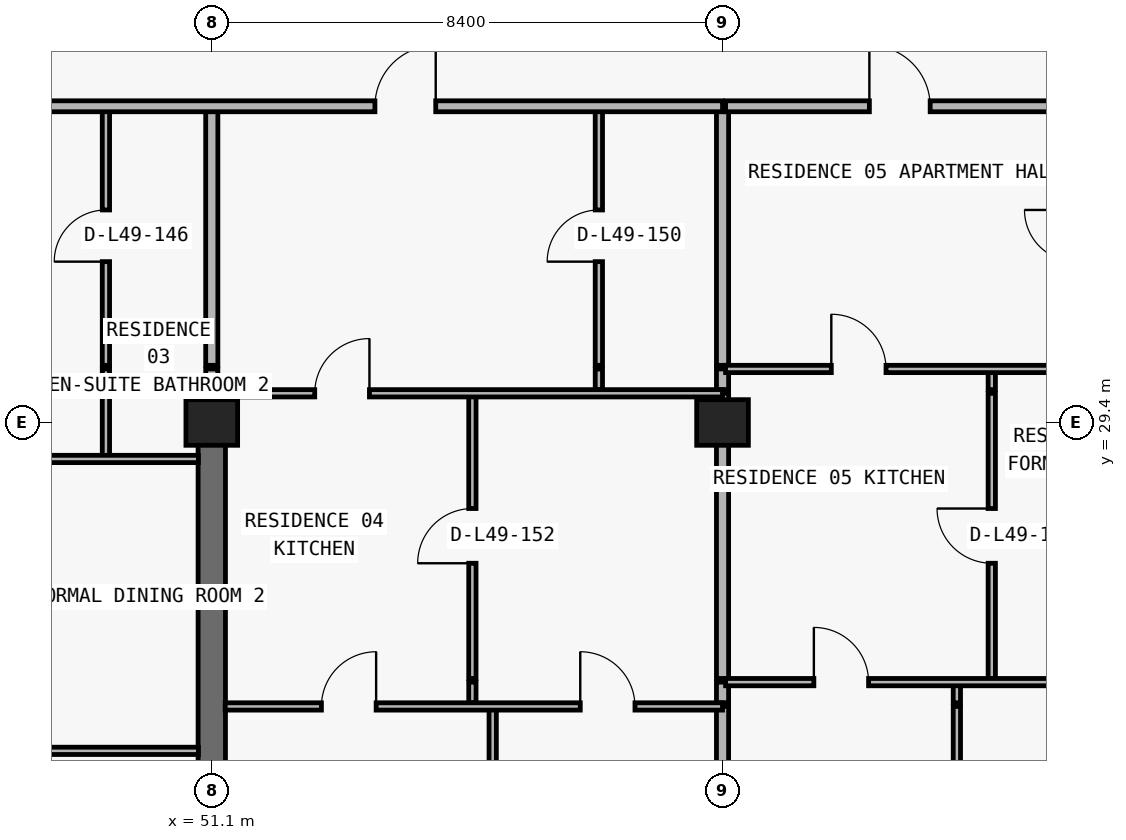
"""IFC4 building model, lengths in metres.
Left out: names, types, materials, properties, quantities, classifications, styles, units other than length and angle.
Written with IfcOpenShell. Run it as: python <this file> out.ifc"""

import sys

from ifc_helpers import new_model, si_unit, direction, frame, frame_2d, origin, origin_2d, place, context, subcontext, project, spatial, rectangle, extrude, element, fill, save


model = new_model("IFC4")
c1 = context("Model", 3, precision=1e-05, world=origin(), true_north=direction((0.0, 1.0)))
c2 = subcontext(c1, "Body", "Model", "MODEL_VIEW")
j1 = project(units=[si_unit("LENGTHUNIT", "METRE"), si_unit("PLANEANGLEUNIT", "RADIAN")], contexts=[c1])
p1 = place(None, origin())
s1 = spatial("IfcSite", under=j1, at=p1, CompositionType="ELEMENT")
p2 = place(p1, origin())
s2 = spatial("IfcBuilding", under=s1, at=p2, CompositionType="ELEMENT")
p3 = place(p2, frame((0.0, 0.0, 177.0)))
s3 = spatial("IfcBuildingStorey", under=s2, at=p3, CompositionType="ELEMENT", Elevation=177.0)
for number, where, z_axis, x_axis in (
    (1, (51.1, 29.4, 0.0), (0.0, 0.0, 1.0), (1.0, 0.0, 0.0)),
    (2, (59.5, 29.4, 0.0), (0.0, 0.0, 1.0), (1.0, 0.0, 0.0)),
):
    element("IfcColumn", number, at=place(p3, frame(where, z_axis=z_axis, x_axis=x_axis)), inside=s3, PredefinedType="COLUMN", context=c2, shape_type="SweptSolid", body=[
        extrude(rectangle(XDim=0.85, YDim=0.75, at=origin_2d()), origin(), (0.0, 0.0, 1.0), 3.05),
    ])
p4 = place(p3, frame((51.1, 20.8, 0.0), z_axis=(0.0, 0.0, 1.0), x_axis=(0.0, 1.0, 0.0)))
e3 = element("IfcWall", 3, at=p4, inside=s3, PredefinedType="SHEAR", context=c2, shape_type="SweptSolid", body=[
    extrude(rectangle(XDim=8.6, YDim=0.45, at=frame_2d((4.3, 0.0))), origin(), (0.0, 0.0, 1.0), 3.05),
])
p5 = place(p3, frame((49.359, 28.8, 0.0), z_axis=(0.0, 0.0, 1.0), x_axis=(0.0, 1.0, 0.0)))
e4 = element("IfcWall", 4, at=p5, inside=s3, PredefinedType="PARTITIONING", context=c2, shape_type="SweptSolid", body=[
    extrude(rectangle(XDim=1.08, YDim=0.12, at=frame_2d((0.54, 0.0))), origin(), (0.0, 0.0, 1.0), 3.05),
])
p6 = place(p3, frame((49.359, 29.94, 0.0), z_axis=(0.0, 0.0, 1.0), x_axis=(0.0, 1.0, 0.0)))
e5 = element("IfcWall", 5, at=p6, inside=s3, PredefinedType="PARTITIONING", context=c2, shape_type="SweptSolid", body=[
    extrude(rectangle(XDim=0.34, YDim=0.12, at=frame_2d((0.17, 0.0))), origin(), (0.0, 0.0, 1.0), 3.05),
])
p7 = place(p3, frame((49.359, 30.34, 0.0), z_axis=(0.0, 0.0, 1.0), x_axis=(0.0, 1.0, 0.0)))
e6 = element("IfcWall", 6, at=p7, inside=s3, PredefinedType="PARTITIONING", context=c2, shape_type="SweptSolid", body=[
    extrude(rectangle(XDim=4.26, YDim=0.12, at=frame_2d((2.13, 0.0))), origin(), (0.0, 0.0, 1.0), 3.05),
])
p8 = place(p7, frame((1.705, 0.0, 0.0)))
e7 = element("IfcOpeningElement", 7, at=p8, cuts=e6, PredefinedType="OPENING", context=c2, shape_type="SweptSolid", body=[
    extrude(rectangle(XDim=0.85, YDim=2.1, at=frame_2d((0.425, 1.05))), frame((0.0, 0.07, 0.0), z_axis=(0.0, -1.0, 0.0), x_axis=(1.0, 0.0, 0.0)), (0.0, 0.0, 1.0), 0.14),
])
p9 = place(p3, frame((51.1, 29.405, 0.0), z_axis=(0.0, 0.0, 1.0), x_axis=(0.0, 1.0, 0.0)))
e8 = element("IfcWall", 8, at=p9, inside=s3, PredefinedType="PARTITIONING", context=c2, shape_type="SweptSolid", body=[
    extrude(rectangle(XDim=0.475, YDim=0.2, at=frame_2d((0.237, 0.0))), origin(), (0.0, 0.0, 1.0), 2.335),
])
p10 = place(p3, frame((51.1, 29.94, 0.0), z_axis=(0.0, 0.0, 1.0), x_axis=(0.0, 1.0, 0.0)))
e9 = element("IfcWall", 9, at=p10, inside=s3, PredefinedType="PARTITIONING", context=c2, shape_type="SweptSolid", body=[
    extrude(rectangle(XDim=0.34, YDim=0.2, at=frame_2d((0.17, 0.0))), origin(), (0.0, 0.0, 1.0), 2.335),
])
p11 = place(p3, frame((51.1, 30.34, 0.0), z_axis=(0.0, 0.0, 1.0), x_axis=(0.0, 1.0, 0.0)))
e10 = element("IfcWall", 10, at=p11, inside=s3, PredefinedType="PARTITIONING", context=c2, shape_type="SweptSolid", body=[
    extrude(rectangle(XDim=4.26, YDim=0.2, at=frame_2d((2.13, 0.0))), origin(), (0.0, 0.0, 1.0), 2.335),
])
p12 = place(p3, frame((55.386, 24.79, 0.0), z_axis=(0.0, 0.0, 1.0), x_axis=(0.0, 1.0, 0.0)))
e11 = element("IfcWall", 11, at=p12, inside=s3, PredefinedType="PARTITIONING", context=c2, shape_type="SweptSolid", body=[
    extrude(rectangle(XDim=0.34, YDim=0.12, at=frame_2d((0.17, 0.0))), origin(), (0.0, 0.0, 1.0), 2.499),
])
p13 = place(p3, frame((55.386, 25.19, 0.0), z_axis=(0.0, 0.0, 1.0), x_axis=(0.0, 1.0, 0.0)))
e12 = element("IfcWall", 12, at=p13, inside=s3, PredefinedType="PARTITIONING", context=c2, shape_type="SweptSolid", body=[
    extrude(rectangle(XDim=4.69, YDim=0.12, at=frame_2d((2.345, 0.0))), origin(), (0.0, 0.0, 1.0), 2.499),
])
p14 = place(p13, frame((1.895, 0.0, 0.0)))
e13 = element("IfcOpeningElement", 13, at=p14, cuts=e12, PredefinedType="OPENING", context=c2, shape_type="SweptSolid", body=[
    extrude(rectangle(XDim=0.9, YDim=2.15, at=frame_2d((0.45, 1.075))), frame((0.0, 0.07, 0.0), z_axis=(0.0, -1.0, 0.0), x_axis=(1.0, 0.0, 0.0)), (0.0, 0.0, 1.0), 0.14),
])
p15 = place(p3, frame((55.72, 11.24, 0.0), z_axis=(0.0, 0.0, 1.0), x_axis=(0.0, 1.0, 0.0)))
e14 = element("IfcWall", 14, at=p15, inside=s3, PredefinedType="PARTITIONING", context=c2, shape_type="SweptSolid", body=[
    extrude(rectangle(XDim=13.49, YDim=0.12, at=frame_2d((6.745, 0.0))), origin(), (0.0, 0.0, 1.0), 3.05),
])
p16 = place(p3, frame((57.466, 29.94, 0.0), z_axis=(0.0, 0.0, 1.0), x_axis=(0.0, 1.0, 0.0)))
e15 = element("IfcWall", 15, at=p16, inside=s3, PredefinedType="PARTITIONING", context=c2, shape_type="SweptSolid", body=[
    extrude(rectangle(XDim=0.34, YDim=0.12, at=frame_2d((0.17, 0.0))), origin(), (0.0, 0.0, 1.0), 3.05),
])
p17 = place(p3, frame((57.466, 30.34, 0.0), z_axis=(0.0, 0.0, 1.0), x_axis=(0.0, 1.0, 0.0)))
e16 = element("IfcWall", 16, at=p17, inside=s3, PredefinedType="PARTITIONING", context=c2, shape_type="SweptSolid", body=[
    extrude(rectangle(XDim=4.26, YDim=0.12, at=frame_2d((2.13, 0.0))), origin(), (0.0, 0.0, 1.0), 3.05),
])
p18 = place(p17, frame((1.705, 0.0, 0.0)))
e17 = element("IfcOpeningElement", 17, at=p18, cuts=e16, PredefinedType="OPENING", context=c2, shape_type="SweptSolid", body=[
    extrude(rectangle(XDim=0.85, YDim=2.1, at=frame_2d((0.425, 1.05))), frame((0.0, 0.07, 0.0), z_axis=(0.0, -1.0, 0.0), x_axis=(1.0, 0.0, 0.0)), (0.0, 0.0, 1.0), 0.14),
])
p19 = place(p3, frame((59.5, 11.24, 0.0), z_axis=(0.0, 0.0, 1.0), x_axis=(0.0, 1.0, 0.0)))
e18 = element("IfcWall", 18, at=p19, inside=s3, PredefinedType="PARTITIONING", context=c2, shape_type="SweptSolid", body=[
    extrude(rectangle(XDim=13.49, YDim=0.2, at=frame_2d((6.745, 0.0))), origin(), (0.0, 0.0, 1.0), 2.263),
])
p20 = place(p3, frame((59.5, 24.79, 0.0), z_axis=(0.0, 0.0, 1.0), x_axis=(0.0, 1.0, 0.0)))
e19 = element("IfcWall", 19, at=p20, inside=s3, PredefinedType="PARTITIONING", context=c2, shape_type="SweptSolid", body=[
    extrude(rectangle(XDim=0.34, YDim=0.2, at=frame_2d((0.17, 0.0))), origin(), (0.0, 0.0, 1.0), 2.263),
])
p21 = place(p3, frame((59.5, 25.19, 0.0), z_axis=(0.0, 0.0, 1.0), x_axis=(0.0, 1.0, 0.0)))
e20 = element("IfcWall", 20, at=p21, inside=s3, PredefinedType="PARTITIONING", context=c2, shape_type="SweptSolid", body=[
    extrude(rectangle(XDim=4.69, YDim=0.2, at=frame_2d((2.345, 0.0))), origin(), (0.0, 0.0, 1.0), 2.263),
])
p22 = place(p3, frame((59.5, 29.94, 0.0), z_axis=(0.0, 0.0, 1.0), x_axis=(0.0, 1.0, 0.0)))
e21 = element("IfcWall", 21, at=p22, inside=s3, PredefinedType="PARTITIONING", context=c2, shape_type="SweptSolid", body=[
    extrude(rectangle(XDim=0.34, YDim=0.2, at=frame_2d((0.17, 0.0))), origin(), (0.0, 0.0, 1.0), 2.263),
])
p23 = place(p3, frame((59.5, 30.34, 0.0), z_axis=(0.0, 0.0, 1.0), x_axis=(0.0, 1.0, 0.0)))
e22 = element("IfcWall", 22, at=p23, inside=s3, PredefinedType="PARTITIONING", context=c2, shape_type="SweptSolid", body=[
    extrude(rectangle(XDim=4.26, YDim=0.2, at=frame_2d((2.13, 0.0))), origin(), (0.0, 0.0, 1.0), 2.263),
])
p24 = place(p3, frame((63.354, 11.24, 0.0), z_axis=(0.0, 0.0, 1.0), x_axis=(0.0, 1.0, 0.0)))
e23 = element("IfcWall", 23, at=p24, inside=s3, PredefinedType="PARTITIONING", context=c2, shape_type="SweptSolid", body=[
    extrude(rectangle(XDim=13.49, YDim=0.12, at=frame_2d((6.745, 0.0))), origin(), (0.0, 0.0, 1.0), 3.05),
])
p25 = place(p3, frame((63.354, 24.79, 0.0), z_axis=(0.0, 0.0, 1.0), x_axis=(0.0, 1.0, 0.0)))
e24 = element("IfcWall", 24, at=p25, inside=s3, PredefinedType="PARTITIONING", context=c2, shape_type="SweptSolid", body=[
    extrude(rectangle(XDim=0.34, YDim=0.12, at=frame_2d((0.17, 0.0))), origin(), (0.0, 0.0, 1.0), 3.05),
])
p26 = place(p3, frame((63.928, 25.19, 0.0), z_axis=(0.0, 0.0, 1.0), x_axis=(0.0, 1.0, 0.0)))
e25 = element("IfcWall", 25, at=p26, inside=s3, PredefinedType="PARTITIONING", context=c2, shape_type="SweptSolid", body=[
    extrude(rectangle(XDim=4.69, YDim=0.12, at=frame_2d((2.345, 0.0))), origin(), (0.0, 0.0, 1.0), 2.499),
])
p27 = place(p26, frame((1.895, 0.0, 0.0)))
e26 = element("IfcOpeningElement", 26, at=p27, cuts=e25, PredefinedType="OPENING", context=c2, shape_type="SweptSolid", body=[
    extrude(rectangle(XDim=0.9, YDim=2.15, at=frame_2d((0.45, 1.075))), frame((0.0, 0.07, 0.0), z_axis=(0.0, -1.0, 0.0), x_axis=(1.0, 0.0, 0.0)), (0.0, 0.0, 1.0), 0.14),
])
p28 = place(p3, frame((63.928, 29.94, 0.0), z_axis=(0.0, 0.0, 1.0), x_axis=(0.0, 1.0, 0.0)))
e27 = element("IfcWall", 27, at=p28, inside=s3, PredefinedType="PARTITIONING", context=c2, shape_type="SweptSolid", body=[
    extrude(rectangle(XDim=0.34, YDim=0.12, at=frame_2d((0.17, 0.0))), origin(), (0.0, 0.0, 1.0), 2.499),
])
p29 = place(p3, frame((42.7, 24.0, 0.0), z_axis=(0.0, 0.0, 1.0), x_axis=(1.0, 0.0, 0.0)))
e28 = element("IfcWall", 28, at=p29, inside=s3, PredefinedType="PARTITIONING", context=c2, shape_type="SweptSolid", body=[
    extrude(rectangle(XDim=8.18, YDim=0.12, at=frame_2d((4.09, 0.0))), origin(), (0.0, 0.0, 1.0), 3.05),
])
p30 = place(p29, frame((3.64, 0.0, 0.0)))
e29 = element("IfcOpeningElement", 29, at=p30, cuts=e28, PredefinedType="OPENING", context=c2, shape_type="SweptSolid", body=[
    extrude(rectangle(XDim=0.9, YDim=2.15, at=frame_2d((0.45, 1.075))), frame((0.0, 0.07, 0.0), z_axis=(0.0, -1.0, 0.0), x_axis=(1.0, 0.0, 0.0)), (0.0, 0.0, 1.0), 0.14),
])
p31 = place(p3, frame((51.32, 24.73, 0.0), z_axis=(0.0, 0.0, 1.0), x_axis=(1.0, 0.0, 0.0)))
e30 = element("IfcWall", 30, at=p31, inside=s3, PredefinedType="PARTITIONING", context=c2, shape_type="SweptSolid", body=[
    extrude(rectangle(XDim=8.18, YDim=0.12, at=frame_2d((4.09, 0.0))), origin(), (0.0, 0.0, 1.0), 3.05),
])
p32 = place(p31, frame((1.583, 0.0, 0.0)))
e31 = element("IfcOpeningElement", 31, at=p32, cuts=e30, PredefinedType="OPENING", context=c2, shape_type="SweptSolid", body=[
    extrude(rectangle(XDim=0.9, YDim=2.15, at=frame_2d((0.45, 1.075))), frame((0.0, 0.07, 0.0), z_axis=(0.0, -1.0, 0.0), x_axis=(1.0, 0.0, 0.0)), (0.0, 0.0, 1.0), 0.14),
])
p33 = place(p31, frame((5.84, 0.0, 0.0)))
e32 = element("IfcOpeningElement", 32, at=p33, cuts=e30, PredefinedType="OPENING", context=c2, shape_type="SweptSolid", body=[
    extrude(rectangle(XDim=0.9, YDim=2.15, at=frame_2d((0.45, 1.075))), frame((0.0, 0.07, 0.0), z_axis=(0.0, -1.0, 0.0), x_axis=(1.0, 0.0, 0.0)), (0.0, 0.0, 1.0), 0.14),
])
p34 = place(p3, frame((59.55, 25.13, 0.0), z_axis=(0.0, 0.0, 1.0), x_axis=(1.0, 0.0, 0.0)))
e33 = element("IfcWall", 33, at=p34, inside=s3, PredefinedType="PARTITIONING", context=c2, shape_type="SweptSolid", body=[
    extrude(rectangle(XDim=5.73, YDim=0.12, at=frame_2d((2.865, 0.0))), origin(), (0.0, 0.0, 1.0), 3.05),
])
p35 = place(p34, frame((1.452, 0.0, 0.0)))
e34 = element("IfcOpeningElement", 34, at=p35, cuts=e33, PredefinedType="OPENING", context=c2, shape_type="SweptSolid", body=[
    extrude(rectangle(XDim=0.9, YDim=2.15, at=frame_2d((0.45, 1.075))), frame((0.0, 0.07, 0.0), z_axis=(0.0, -1.0, 0.0), x_axis=(1.0, 0.0, 0.0)), (0.0, 0.0, 1.0), 0.14),
])
p36 = place(p3, frame((42.705, 28.8, 0.0), z_axis=(0.0, 0.0, 1.0), x_axis=(1.0, 0.0, 0.0)))
e35 = element("IfcWall", 35, at=p36, inside=s3, PredefinedType="PARTITIONING", context=c2, shape_type="SweptSolid", body=[
    extrude(rectangle(XDim=8.175, YDim=0.12, at=frame_2d((4.087, 0.0))), origin(), (0.0, 0.0, 1.0), 3.05),
])
p37 = place(p36, frame((2.877, 0.0, 0.0)))
e36 = element("IfcOpeningElement", 36, at=p37, cuts=e35, PredefinedType="OPENING", context=c2, shape_type="SweptSolid", body=[
    extrude(rectangle(XDim=0.9, YDim=2.15, at=frame_2d((0.45, 1.075))), frame((0.0, 0.07, 0.0), z_axis=(0.0, -1.0, 0.0), x_axis=(1.0, 0.0, 0.0)), (0.0, 0.0, 1.0), 0.14),
])
p38 = place(p3, frame((51.1, 29.88, 0.0), z_axis=(0.0, 0.0, 1.0), x_axis=(1.0, 0.0, 0.0)))
e37 = element("IfcWall", 37, at=p38, inside=s3, PredefinedType="PARTITIONING", context=c2, shape_type="SweptSolid", body=[
    extrude(rectangle(XDim=8.4, YDim=0.12, at=frame_2d((4.2, 0.0))), origin(), (0.0, 0.0, 1.0), 3.05),
])
p39 = place(p38, frame((1.693, 0.0, 0.0)))
e38 = element("IfcOpeningElement", 38, at=p39, cuts=e37, PredefinedType="OPENING", context=c2, shape_type="SweptSolid", body=[
    extrude(rectangle(XDim=0.9, YDim=2.15, at=frame_2d((0.45, 1.075))), frame((0.0, 0.07, 0.0), z_axis=(0.0, -1.0, 0.0), x_axis=(1.0, 0.0, 0.0)), (0.0, 0.0, 1.0), 0.14),
])
p40 = place(p3, frame((59.55, 30.28, 0.0), z_axis=(0.0, 0.0, 1.0), x_axis=(1.0, 0.0, 0.0)))
e39 = element("IfcWall", 39, at=p40, inside=s3, PredefinedType="PARTITIONING", context=c2, shape_type="SweptSolid", body=[
    extrude(rectangle(XDim=5.73, YDim=0.12, at=frame_2d((2.865, 0.0))), origin(), (0.0, 0.0, 1.0), 3.05),
])
p41 = place(p40, frame((1.739, 0.0, 0.0)))
e40 = element("IfcOpeningElement", 40, at=p41, cuts=e39, PredefinedType="OPENING", context=c2, shape_type="SweptSolid", body=[
    extrude(rectangle(XDim=0.9, YDim=2.15, at=frame_2d((0.45, 1.075))), frame((0.0, 0.07, 0.0), z_axis=(0.0, -1.0, 0.0), x_axis=(1.0, 0.0, 0.0)), (0.0, 0.0, 1.0), 0.14),
])
p42 = place(p3, frame((18.3, 34.6, 0.0), z_axis=(0.0, 0.0, 1.0), x_axis=(1.0, 0.0, 0.0)))
e41 = element("IfcWall", 41, at=p42, inside=s3, PredefinedType="PARTITIONING", context=c2, shape_type="SweptSolid", body=[
    extrude(rectangle(XDim=41.2, YDim=0.18, at=frame_2d((20.6, 0.0))), origin(), (0.0, 0.0, 1.0), 3.05),
])
p43 = place(p42, frame((2.67, 0.0, 0.0)))
e42 = element("IfcOpeningElement", 42, at=p43, cuts=e41, PredefinedType="OPENING", context=c2, shape_type="SweptSolid", body=[
    extrude(rectangle(XDim=1.0, YDim=2.2, at=frame_2d((0.5, 1.1))), frame((0.0, 0.1, 0.0), z_axis=(0.0, -1.0, 0.0), x_axis=(1.0, 0.0, 0.0)), (0.0, 0.0, 1.0), 0.2),
])
p44 = place(p42, frame((11.212, 0.0, 0.0)))
e43 = element("IfcOpeningElement", 43, at=p44, cuts=e41, PredefinedType="OPENING", context=c2, shape_type="SweptSolid", body=[
    extrude(rectangle(XDim=1.0, YDim=2.2, at=frame_2d((0.5, 1.1))), frame((0.0, 0.1, 0.0), z_axis=(0.0, -1.0, 0.0), x_axis=(1.0, 0.0, 0.0)), (0.0, 0.0, 1.0), 0.2),
])
p45 = place(p42, frame((35.483, 0.0, 0.0)))
e44 = element("IfcOpeningElement", 44, at=p45, cuts=e41, PredefinedType="OPENING", context=c2, shape_type="SweptSolid", body=[
    extrude(rectangle(XDim=1.0, YDim=2.2, at=frame_2d((0.5, 1.1))), frame((0.0, 0.1, 0.0), z_axis=(0.0, -1.0, 0.0), x_axis=(1.0, 0.0, 0.0)), (0.0, 0.0, 1.0), 0.2),
])
p46 = place(p3, frame((59.55, 34.6, 0.0), z_axis=(0.0, 0.0, 1.0), x_axis=(1.0, 0.0, 0.0)))
e45 = element("IfcWall", 45, at=p46, inside=s3, PredefinedType="PARTITIONING", context=c2, shape_type="SweptSolid", body=[
    extrude(rectangle(XDim=5.73, YDim=0.18, at=frame_2d((2.865, 0.0))), origin(), (0.0, 0.0, 1.0), 3.05),
])
p47 = place(p46, frame((2.365, 0.0, 0.0)))
e46 = element("IfcOpeningElement", 46, at=p47, cuts=e45, PredefinedType="OPENING", context=c2, shape_type="SweptSolid", body=[
    extrude(rectangle(XDim=1.0, YDim=2.2, at=frame_2d((0.5, 1.1))), frame((0.0, 0.1, 0.0), z_axis=(0.0, -1.0, 0.0), x_axis=(1.0, 0.0, 0.0)), (0.0, 0.0, 1.0), 0.2),
])
p48 = place(p8, origin())
e47 = element("IfcDoor", 47, at=p48, inside=s3, OperationType="SINGLE_SWING_LEFT", PredefinedType="DOOR", context=c2, shape_type="SweptSolid", body=[
    extrude(rectangle(XDim=0.85, YDim=2.1, at=frame_2d((0.425, 1.05))), frame((0.0, 0.025, 0.0), z_axis=(0.0, -1.0, 0.0), x_axis=(1.0, 0.0, 0.0)), (0.0, 0.0, 1.0), 0.05),
])
fill(e7, e47)
p49 = place(p45, origin())
e48 = element("IfcDoor", 48, at=p49, inside=s3, OperationType="SINGLE_SWING_RIGHT", PredefinedType="DOOR", context=c2, shape_type="SweptSolid", body=[
    extrude(rectangle(XDim=1.0, YDim=2.2, at=frame_2d((0.5, 1.1))), frame((0.0, 0.025, 0.0), z_axis=(0.0, -1.0, 0.0), x_axis=(1.0, 0.0, 0.0)), (0.0, 0.0, 1.0), 0.05),
])
fill(e44, e48)
p50 = place(p18, origin())
e49 = element("IfcDoor", 49, at=p50, inside=s3, OperationType="SINGLE_SWING_LEFT", PredefinedType="DOOR", context=c2, shape_type="SweptSolid", body=[
    extrude(rectangle(XDim=0.85, YDim=2.1, at=frame_2d((0.425, 1.05))), frame((0.0, 0.025, 0.0), z_axis=(0.0, -1.0, 0.0), x_axis=(1.0, 0.0, 0.0)), (0.0, 0.0, 1.0), 0.05),
])
fill(e17, e49)
p51 = place(p39, origin())
e50 = element("IfcDoor", 50, at=p51, inside=s3, OperationType="SINGLE_SWING_RIGHT", PredefinedType="DOOR", context=c2, shape_type="SweptSolid", body=[
    extrude(rectangle(XDim=0.9, YDim=2.15, at=frame_2d((0.45, 1.075))), frame((0.0, 0.025, 0.0), z_axis=(0.0, -1.0, 0.0), x_axis=(1.0, 0.0, 0.0)), (0.0, 0.0, 1.0), 0.05),
])
fill(e38, e50)
p52 = place(p14, origin())
e51 = element("IfcDoor", 51, at=p52, inside=s3, OperationType="SINGLE_SWING_LEFT", PredefinedType="DOOR", context=c2, shape_type="SweptSolid", body=[
    extrude(rectangle(XDim=0.9, YDim=2.15, at=frame_2d((0.45, 1.075))), frame((0.0, 0.025, 0.0), z_axis=(0.0, -1.0, 0.0), x_axis=(1.0, 0.0, 0.0)), (0.0, 0.0, 1.0), 0.05),
])
fill(e13, e51)
p53 = place(p32, origin())
e52 = element("IfcDoor", 52, at=p53, inside=s3, OperationType="SINGLE_SWING_RIGHT", PredefinedType="DOOR", context=c2, shape_type="SweptSolid", body=[
    extrude(rectangle(XDim=0.9, YDim=2.15, at=frame_2d((0.45, 1.075))), frame((0.0, 0.025, 0.0), z_axis=(0.0, -1.0, 0.0), x_axis=(1.0, 0.0, 0.0)), (0.0, 0.0, 1.0), 0.05),
])
fill(e31, e52)
p54 = place(p33, origin())
e53 = element("IfcDoor", 53, at=p54, inside=s3, OperationType="SINGLE_SWING_LEFT", PredefinedType="DOOR", context=c2, shape_type="SweptSolid", body=[
    extrude(rectangle(XDim=0.9, YDim=2.15, at=frame_2d((0.45, 1.075))), frame((0.0, 0.025, 0.0), z_axis=(0.0, -1.0, 0.0), x_axis=(1.0, 0.0, 0.0)), (0.0, 0.0, 1.0), 0.05),
])
fill(e32, e53)
p55 = place(p47, origin())
e54 = element("IfcDoor", 54, at=p55, inside=s3, OperationType="SINGLE_SWING_LEFT", PredefinedType="DOOR", context=c2, shape_type="SweptSolid", body=[
    extrude(rectangle(XDim=1.0, YDim=2.2, at=frame_2d((0.5, 1.1))), frame((0.0, 0.025, 0.0), z_axis=(0.0, -1.0, 0.0), x_axis=(1.0, 0.0, 0.0)), (0.0, 0.0, 1.0), 0.05),
])
fill(e46, e54)
p56 = place(p41, origin())
e55 = element("IfcDoor", 55, at=p56, inside=s3, OperationType="SINGLE_SWING_LEFT", PredefinedType="DOOR", context=c2, shape_type="SweptSolid", body=[
    extrude(rectangle(XDim=0.9, YDim=2.15, at=frame_2d((0.45, 1.075))), frame((0.0, 0.025, 0.0), z_axis=(0.0, -1.0, 0.0), x_axis=(1.0, 0.0, 0.0)), (0.0, 0.0, 1.0), 0.05),
])
fill(e40, e55)
p57 = place(p27, origin())
e56 = element("IfcDoor", 56, at=p57, inside=s3, OperationType="SINGLE_SWING_RIGHT", PredefinedType="DOOR", context=c2, shape_type="SweptSolid", body=[
    extrude(rectangle(XDim=0.9, YDim=2.15, at=frame_2d((0.45, 1.075))), frame((0.0, 0.025, 0.0), z_axis=(0.0, -1.0, 0.0), x_axis=(1.0, 0.0, 0.0)), (0.0, 0.0, 1.0), 0.05),
])
fill(e26, e56)
p58 = place(p35, origin())
e57 = element("IfcDoor", 57, at=p58, inside=s3, OperationType="SINGLE_SWING_LEFT", PredefinedType="DOOR", context=c2, shape_type="SweptSolid", body=[
    extrude(rectangle(XDim=0.9, YDim=2.15, at=frame_2d((0.45, 1.075))), frame((0.0, 0.025, 0.0), z_axis=(0.0, -1.0, 0.0), x_axis=(1.0, 0.0, 0.0)), (0.0, 0.0, 1.0), 0.05),
])
fill(e34, e57)
save(model, sys.argv[1])
